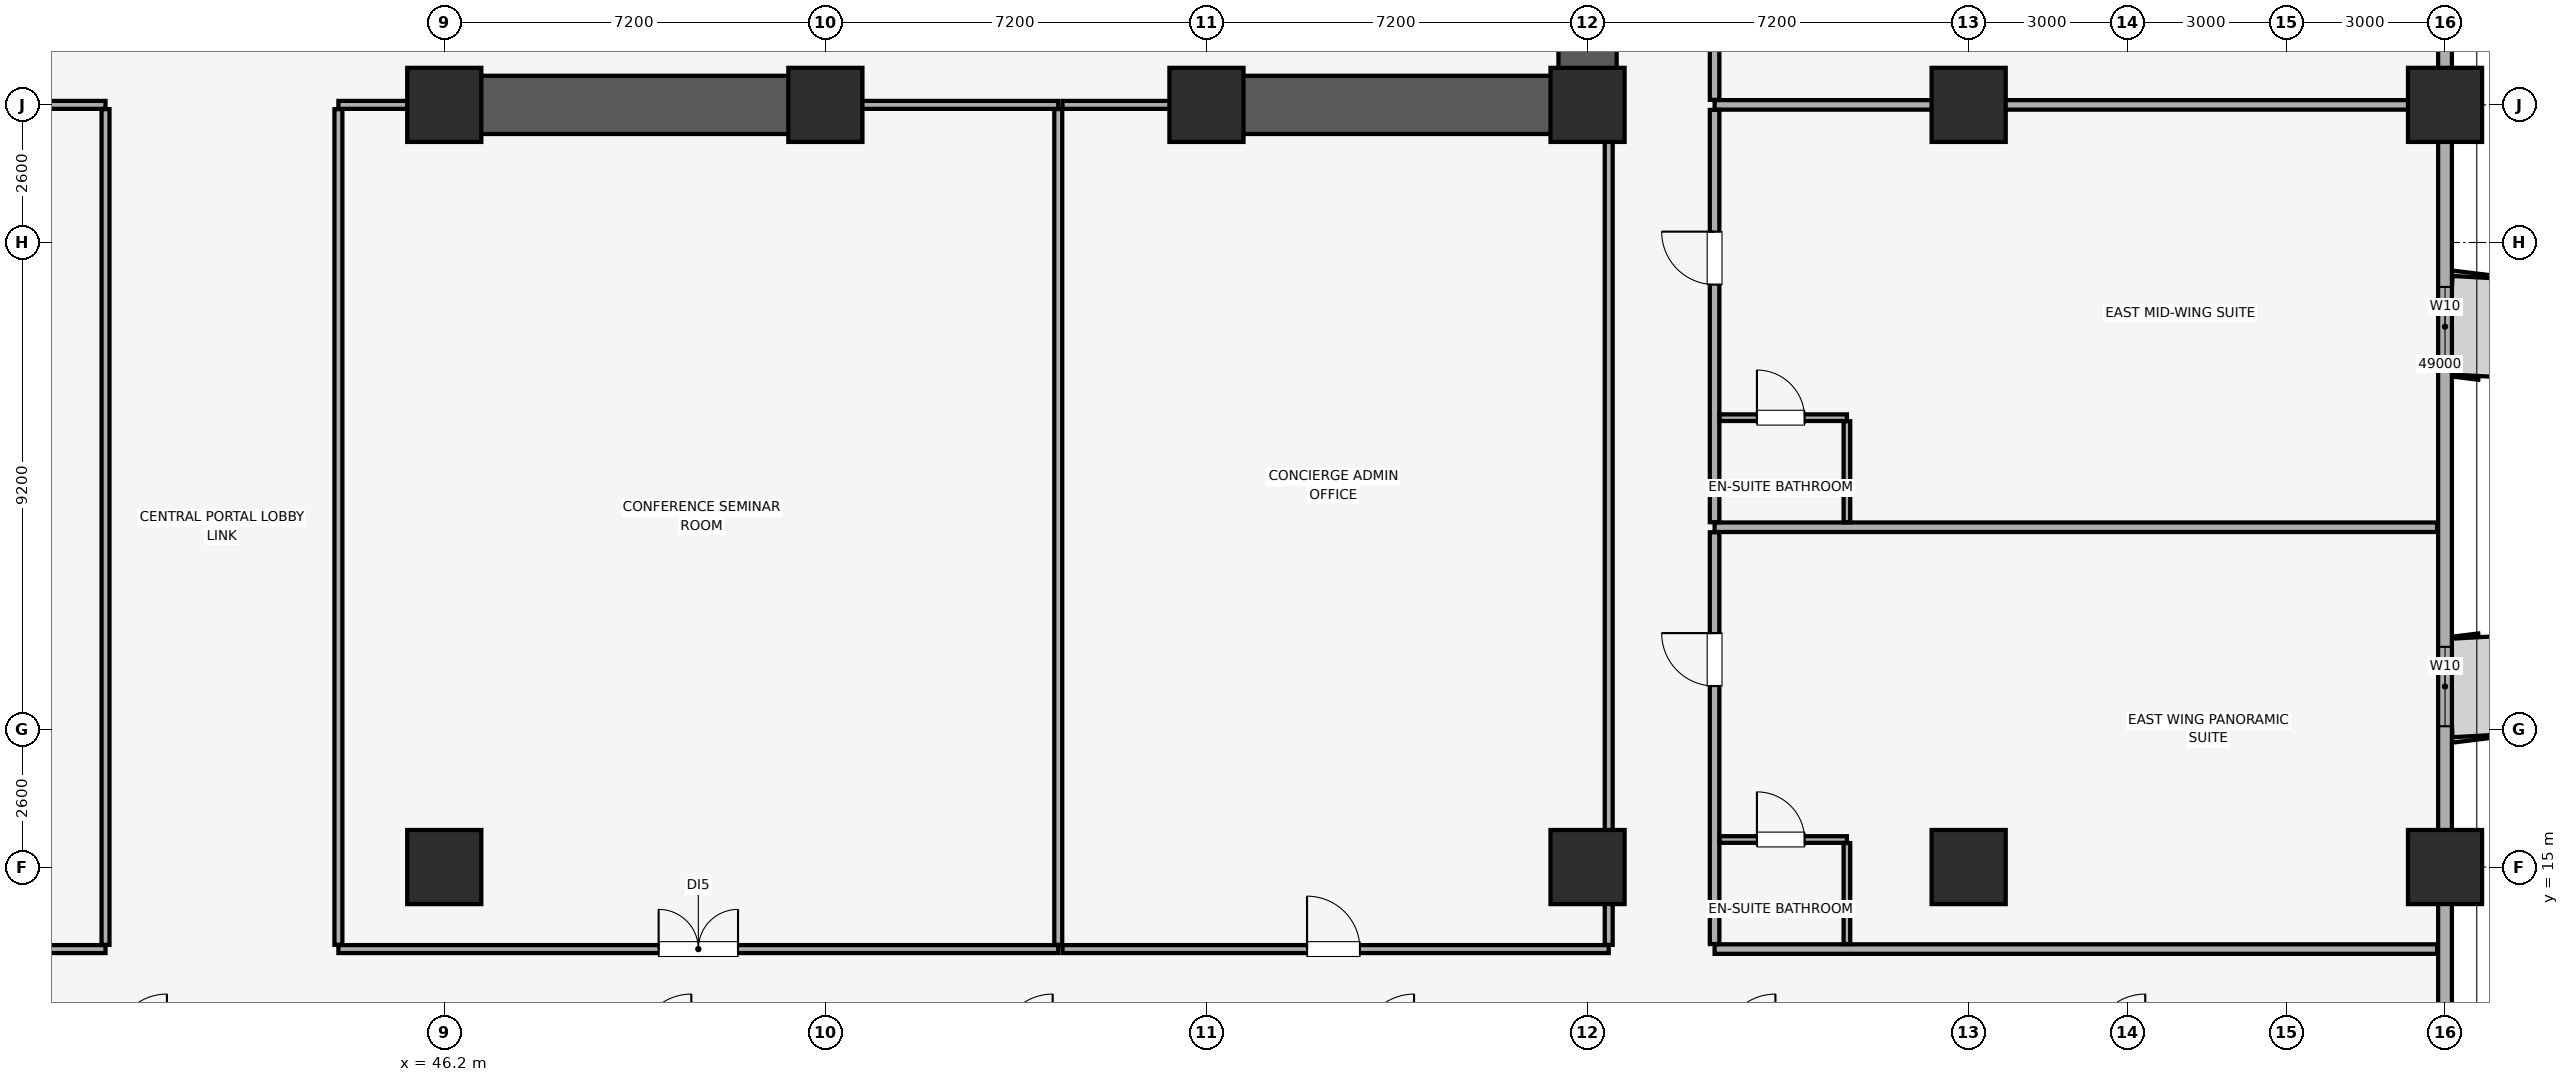
"""IFC4 building model, lengths in metres.
Left out: names, types, materials, properties, quantities, classifications, styles, units other than length and angle.
Written with IfcOpenShell. Run it as: python <this file> out.ifc"""

import sys

from ifc_helpers import new_model, si_unit, direction, frame, frame_2d, origin, origin_2d, place, context, subcontext, project, spatial, rectangle, extrude, element, fill, save


model = new_model("IFC4")
c1 = context("Model", 3, precision=1e-05, world=origin(), true_north=direction((0.0, 1.0)))
c2 = subcontext(c1, "Body", "Model", "MODEL_VIEW")
j1 = project(units=[si_unit("LENGTHUNIT", "METRE"), si_unit("PLANEANGLEUNIT", "RADIAN")], contexts=[c1])
p1 = place(None, origin())
s1 = spatial("IfcSite", under=j1, at=p1, CompositionType="ELEMENT")
p2 = place(p1, origin())
s2 = spatial("IfcBuilding", under=s1, at=p2, CompositionType="ELEMENT")
p3 = place(p2, frame((0.0, 0.0, 57.65)))
s3 = spatial("IfcBuildingStorey", under=s2, at=p3, CompositionType="ELEMENT", Elevation=57.65)
for number, where, z_axis, x_axis in (
    (1, (84.0, 15.0, 0.0), (0.0, 0.0, 1.0), (1.0, 0.0, 0.0)),
    (2, (84.0, 29.4, 0.0), (0.0, 0.0, 1.0), (1.0, 0.0, 0.0)),
    (3, (46.2, 15.0, 0.0), (0.0, 0.0, 1.0), (1.0, 0.0, 0.0)),
    (4, (67.8, 15.0, 0.0), (0.0, 0.0, 1.0), (1.0, 0.0, 0.0)),
    (5, (75.0, 15.0, 0.0), (0.0, 0.0, 1.0), (1.0, 0.0, 0.0)),
    (6, (46.2, 29.4, 0.0), (0.0, 0.0, 1.0), (1.0, 0.0, 0.0)),
    (7, (53.4, 29.4, 0.0), (0.0, 0.0, 1.0), (1.0, 0.0, 0.0)),
    (8, (60.6, 29.4, 0.0), (0.0, 0.0, 1.0), (1.0, 0.0, 0.0)),
    (9, (67.8, 29.4, 0.0), (0.0, 0.0, 1.0), (1.0, 0.0, 0.0)),
    (10, (75.0, 29.4, 0.0), (0.0, 0.0, 1.0), (1.0, 0.0, 0.0)),
):
    element("IfcColumn", number, at=place(p3, frame(where, z_axis=z_axis, x_axis=x_axis)), inside=s3, PredefinedType="COLUMN", context=c2, shape_type="SweptSolid", body=[
        extrude(rectangle(XDim=1.4, YDim=1.4, at=origin_2d()), origin(), (0.0, 0.0, 1.0), 3.51),
    ])
p4 = place(p3, frame((84.0, 4.2, 0.0), z_axis=(0.0, 0.0, 1.0), x_axis=(0.0, 1.0, 0.0)))
e11 = element("IfcWall", 11, at=p4, inside=s3, PredefinedType="SOLIDWALL", context=c2, shape_type="SweptSolid", body=[
    extrude(rectangle(XDim=40.6, YDim=0.26, at=frame_2d((20.3, 0.0))), origin(), (0.0, 0.0, 1.0), 2.56),
])
p5 = place(p4, frame((4.55, 0.0, 0.85)))
e12 = element("IfcOpeningElement", 12, at=p5, cuts=e11, PredefinedType="OPENING", context=c2, shape_type="SweptSolid", body=[
    extrude(rectangle(XDim=1.5, YDim=1.4, at=frame_2d((0.75, 0.7))), frame((0.0, 0.14, 0.0), z_axis=(0.0, -1.0, 0.0), x_axis=(1.0, 0.0, 0.0)), (0.0, 0.0, 1.0), 0.28),
])
p6 = place(p4, frame((13.46, 0.0, 0.85)))
e13 = element("IfcOpeningElement", 13, at=p6, cuts=e11, PredefinedType="OPENING", context=c2, shape_type="SweptSolid", body=[
    extrude(rectangle(XDim=1.5, YDim=1.4, at=frame_2d((0.75, 0.7))), frame((0.0, 0.14, 0.0), z_axis=(0.0, -1.0, 0.0), x_axis=(1.0, 0.0, 0.0)), (0.0, 0.0, 1.0), 0.28),
])
p7 = place(p4, frame((20.26, 0.0, 0.85)))
e14 = element("IfcOpeningElement", 14, at=p7, cuts=e11, PredefinedType="OPENING", context=c2, shape_type="SweptSolid", body=[
    extrude(rectangle(XDim=1.5, YDim=1.4, at=frame_2d((0.75, 0.7))), frame((0.0, 0.14, 0.0), z_axis=(0.0, -1.0, 0.0), x_axis=(1.0, 0.0, 0.0)), (0.0, 0.0, 1.0), 0.28),
])
p8 = place(p4, frame((27.165, 0.0, 0.85)))
e15 = element("IfcOpeningElement", 15, at=p8, cuts=e11, PredefinedType="OPENING", context=c2, shape_type="SweptSolid", body=[
    extrude(rectangle(XDim=1.5, YDim=1.4, at=frame_2d((0.75, 0.7))), frame((0.0, 0.14, 0.0), z_axis=(0.0, -1.0, 0.0), x_axis=(1.0, 0.0, 0.0)), (0.0, 0.0, 1.0), 0.28),
])
p9 = place(p4, frame((31.935, 0.0, 0.85)))
e16 = element("IfcOpeningElement", 16, at=p9, cuts=e11, PredefinedType="OPENING", context=c2, shape_type="SweptSolid", body=[
    extrude(rectangle(XDim=1.5, YDim=1.4, at=frame_2d((0.75, 0.7))), frame((0.0, 0.14, 0.0), z_axis=(0.0, -1.0, 0.0), x_axis=(1.0, 0.0, 0.0)), (0.0, 0.0, 1.0), 0.28),
])
p10 = place(p4, frame((37.365, 0.0, 0.85)))
e17 = element("IfcOpeningElement", 17, at=p10, cuts=e11, PredefinedType="OPENING", context=c2, shape_type="SweptSolid", body=[
    extrude(rectangle(XDim=1.5, YDim=1.4, at=frame_2d((0.75, 0.7))), frame((0.0, 0.14, 0.0), z_axis=(0.0, -1.0, 0.0), x_axis=(1.0, 0.0, 0.0)), (0.0, 0.0, 1.0), 0.28),
])
p11 = place(p3, frame((67.8, 29.4, 0.0), z_axis=(0.0, 0.0, 1.0), x_axis=(0.0, 1.0, 0.0)))
e18 = element("IfcWall", 18, at=p11, inside=s3, PredefinedType="SHEAR", context=c2, shape_type="SweptSolid", body=[
    extrude(rectangle(XDim=19.2, YDim=1.1, at=frame_2d((9.6, 0.0))), origin(), (0.0, 0.0, 1.0), 3.51),
])
p12 = place(p3, frame((46.0, 29.4, 0.0), z_axis=(0.0, 0.0, 1.0), x_axis=(1.0, 0.0, 0.0)))
e19 = element("IfcWall", 19, at=p12, inside=s3, PredefinedType="SHEAR", context=c2, shape_type="SweptSolid", body=[
    extrude(rectangle(XDim=7.6, YDim=1.1, at=frame_2d((3.8, 0.0))), origin(), (0.0, 0.0, 1.0), 3.51),
])
p13 = place(p3, frame((60.4, 29.4, 0.0), z_axis=(0.0, 0.0, 1.0), x_axis=(1.0, 0.0, 0.0)))
e20 = element("IfcWall", 20, at=p13, inside=s3, PredefinedType="SHEAR", context=c2, shape_type="SweptSolid", body=[
    extrude(rectangle(XDim=6.845, YDim=1.1, at=frame_2d((3.423, 0.0))), origin(), (0.0, 0.0, 1.0), 3.51),
])
p14 = place(p3, frame((29.08, 13.45, 0.0), z_axis=(0.0, 0.0, 1.0), x_axis=(1.0, 0.0, 0.0)))
e21 = element("IfcWall", 21, at=p14, inside=s3, PredefinedType="PARTITIONING", context=c2, shape_type="SweptSolid", body=[
    extrude(rectangle(XDim=10.72, YDim=0.15, at=frame_2d((5.36, 0.0))), origin(), (0.0, 0.0, 1.0), 3.51),
])
p15 = place(p14, frame((4.82, 0.0, 0.0)))
e22 = element("IfcOpeningElement", 22, at=p15, cuts=e21, PredefinedType="OPENING", context=c2, shape_type="SweptSolid", body=[
    extrude(rectangle(XDim=1.0, YDim=2.15, at=frame_2d((0.5, 1.075))), frame((0.0, 0.085, 0.0), z_axis=(0.0, -1.0, 0.0), x_axis=(1.0, 0.0, 0.0)), (0.0, 0.0, 1.0), 0.17),
])
p16 = place(p3, frame((38.01, 29.4, 0.0), z_axis=(0.0, 0.0, 1.0), x_axis=(1.0, 0.0, 0.0)))
e23 = element("IfcWall", 23, at=p16, inside=s3, PredefinedType="PARTITIONING", context=c2, shape_type="SweptSolid", body=[
    extrude(rectangle(XDim=1.79, YDim=0.15, at=frame_2d((0.895, 0.0))), origin(), (0.0, 0.0, 1.0), 2.41),
])
p17 = place(p3, frame((39.8, 13.53, 0.0), z_axis=(0.0, 0.0, 1.0), x_axis=(0.0, 1.0, 0.0)))
e24 = element("IfcWall", 24, at=p17, inside=s3, PredefinedType="PARTITIONING", context=c2, shape_type="SweptSolid", body=[
    extrude(rectangle(XDim=15.79, YDim=0.15, at=frame_2d((7.895, 0.0))), origin(), (0.0, 0.0, 1.0), 3.51),
])
p18 = place(p3, frame((44.2, 13.45, 0.0), z_axis=(0.0, 0.0, 1.0), x_axis=(1.0, 0.0, 0.0)))
e25 = element("IfcWall", 25, at=p18, inside=s3, PredefinedType="PARTITIONING", context=c2, shape_type="SweptSolid", body=[
    extrude(rectangle(XDim=13.6, YDim=0.15, at=frame_2d((6.8, 0.0))), origin(), (0.0, 0.0, 1.0), 3.51),
])
p19 = place(p18, frame((6.05, 0.0, 0.0)))
e26 = element("IfcOpeningElement", 26, at=p19, cuts=e25, PredefinedType="OPENING", context=c2, shape_type="SweptSolid", body=[
    extrude(rectangle(XDim=1.5, YDim=2.25, at=frame_2d((0.75, 1.125))), frame((0.0, 0.085, 0.0), z_axis=(0.0, -1.0, 0.0), x_axis=(1.0, 0.0, 0.0)), (0.0, 0.0, 1.0), 0.17),
])
p20 = place(p3, frame((44.2, 29.4, 0.0), z_axis=(0.0, 0.0, 1.0), x_axis=(1.0, 0.0, 0.0)))
e27 = element("IfcWall", 27, at=p20, inside=s3, PredefinedType="PARTITIONING", context=c2, shape_type="SweptSolid", body=[
    extrude(rectangle(XDim=1.79, YDim=0.15, at=frame_2d((0.895, 0.0))), origin(), (0.0, 0.0, 1.0), 2.41),
])
p21 = place(p3, frame((53.61, 29.4, 0.0), z_axis=(0.0, 0.0, 1.0), x_axis=(1.0, 0.0, 0.0)))
e28 = element("IfcWall", 28, at=p21, inside=s3, PredefinedType="PARTITIONING", context=c2, shape_type="SweptSolid", body=[
    extrude(rectangle(XDim=4.19, YDim=0.15, at=frame_2d((2.095, 0.0))), origin(), (0.0, 0.0, 1.0), 2.41),
])
for number, where, z_axis, x_axis in (
    (29, (44.2, 13.53, 0.0), (0.0, 0.0, 1.0), (0.0, 1.0, 0.0)),
    (30, (57.8, 13.53, 0.0), (0.0, 0.0, 1.0), (0.0, 1.0, 0.0)),
):
    element("IfcWall", number, at=place(p3, frame(where, z_axis=z_axis, x_axis=x_axis)), inside=s3, PredefinedType="PARTITIONING", context=c2, shape_type="SweptSolid", body=[
        extrude(rectangle(XDim=15.79, YDim=0.15, at=frame_2d((7.895, 0.0))), origin(), (0.0, 0.0, 1.0), 3.51),
    ])
p22 = place(p3, frame((57.88, 13.45, 0.0), z_axis=(0.0, 0.0, 1.0), x_axis=(1.0, 0.0, 0.0)))
e31 = element("IfcWall", 31, at=p22, inside=s3, PredefinedType="PARTITIONING", context=c2, shape_type="SweptSolid", body=[
    extrude(rectangle(XDim=10.32, YDim=0.15, at=frame_2d((5.16, 0.0))), origin(), (0.0, 0.0, 1.0), 3.51),
])
p23 = place(p22, frame((4.62, 0.0, 0.0)))
e32 = element("IfcOpeningElement", 32, at=p23, cuts=e31, PredefinedType="OPENING", context=c2, shape_type="SweptSolid", body=[
    extrude(rectangle(XDim=1.0, YDim=2.15, at=frame_2d((0.5, 1.075))), frame((0.0, 0.085, 0.0), z_axis=(0.0, -1.0, 0.0), x_axis=(1.0, 0.0, 0.0)), (0.0, 0.0, 1.0), 0.17),
])
p24 = place(p3, frame((57.88, 29.4, 0.0), z_axis=(0.0, 0.0, 1.0), x_axis=(1.0, 0.0, 0.0)))
e33 = element("IfcWall", 33, at=p24, inside=s3, PredefinedType="PARTITIONING", context=c2, shape_type="SweptSolid", body=[
    extrude(rectangle(XDim=2.51, YDim=0.15, at=frame_2d((1.255, 0.0))), origin(), (0.0, 0.0, 1.0), 2.41),
])
p25 = place(p3, frame((68.2, 13.53, 0.0), z_axis=(0.0, 0.0, 1.0), x_axis=(0.0, 1.0, 0.0)))
e34 = element("IfcWall", 34, at=p25, inside=s3, PredefinedType="PARTITIONING", context=c2, shape_type="SweptSolid", body=[
    extrude(rectangle(XDim=15.86, YDim=0.15, at=frame_2d((7.93, 0.0))), origin(), (0.0, 0.0, 1.0), 3.51),
])
for number, where, z_axis, x_axis in (
    (35, (70.2, 13.45, 0.0), (0.0, 0.0, 1.0), (1.0, 0.0, 0.0)),
    (36, (70.2, 21.42, 0.0), (0.0, 0.0, 1.0), (1.0, 0.0, 0.0)),
):
    element("IfcWall", number, at=place(p3, frame(where, z_axis=z_axis, x_axis=x_axis)), inside=s3, PredefinedType="PARTITIONING", context=c2, shape_type="SweptSolid", body=[
        extrude(rectangle(XDim=13.65, YDim=0.18, at=frame_2d((6.825, 0.0))), origin(), (0.0, 0.0, 1.0), 3.51),
    ])
p26 = place(p3, frame((70.2, 13.545, 0.0), z_axis=(0.0, 0.0, 1.0), x_axis=(0.0, 1.0, 0.0)))
e37 = element("IfcWall", 37, at=p26, inside=s3, PredefinedType="PARTITIONING", context=c2, shape_type="SweptSolid", body=[
    extrude(rectangle(XDim=7.78, YDim=0.18, at=frame_2d((3.89, 0.0))), origin(), (0.0, 0.0, 1.0), 3.51),
])
p27 = place(p26, frame((4.875, 0.0, 0.0)))
e38 = element("IfcOpeningElement", 38, at=p27, cuts=e37, PredefinedType="OPENING", context=c2, shape_type="SweptSolid", body=[
    extrude(rectangle(XDim=1.0, YDim=2.15, at=frame_2d((0.5, 1.075))), frame((0.0, 0.1, 0.0), z_axis=(0.0, -1.0, 0.0), x_axis=(1.0, 0.0, 0.0)), (0.0, 0.0, 1.0), 0.2),
])
p28 = place(p3, frame((70.295, 15.52, 0.0), z_axis=(0.0, 0.0, 1.0), x_axis=(1.0, 0.0, 0.0)))
e39 = element("IfcWall", 39, at=p28, inside=s3, PredefinedType="PARTITIONING", context=c2, shape_type="SweptSolid", body=[
    extrude(rectangle(XDim=2.405, YDim=0.125, at=frame_2d((1.203, 0.0))), origin(), (0.0, 0.0, 1.0), 3.51),
])
p29 = place(p28, frame((0.705, 0.0, 0.0)))
e40 = element("IfcOpeningElement", 40, at=p29, cuts=e39, PredefinedType="OPENING", context=c2, shape_type="SweptSolid", body=[
    extrude(rectangle(XDim=0.9, YDim=2.1, at=frame_2d((0.45, 1.05))), frame((0.0, 0.073, 0.0), z_axis=(0.0, -1.0, 0.0), x_axis=(1.0, 0.0, 0.0)), (0.0, 0.0, 1.0), 0.145),
])
p30 = place(p3, frame((72.7, 13.545, 0.0), z_axis=(0.0, 0.0, 1.0), x_axis=(0.0, 1.0, 0.0)))
e41 = element("IfcWall", 41, at=p30, inside=s3, PredefinedType="PARTITIONING", context=c2, shape_type="SweptSolid", body=[
    extrude(rectangle(XDim=1.907, YDim=0.125, at=frame_2d((0.954, 0.0))), origin(), (0.0, 0.0, 1.0), 3.51),
])
p31 = place(p3, frame((70.2, 29.4, 0.0), z_axis=(0.0, 0.0, 1.0), x_axis=(1.0, 0.0, 0.0)))
e42 = element("IfcWall", 42, at=p31, inside=s3, PredefinedType="PARTITIONING", context=c2, shape_type="SweptSolid", body=[
    extrude(rectangle(XDim=13.65, YDim=0.18, at=frame_2d((6.825, 0.0))), origin(), (0.0, 0.0, 1.0), 2.86),
])
p32 = place(p3, frame((70.2, 21.515, 0.0), z_axis=(0.0, 0.0, 1.0), x_axis=(0.0, 1.0, 0.0)))
e43 = element("IfcWall", 43, at=p32, inside=s3, PredefinedType="PARTITIONING", context=c2, shape_type="SweptSolid", body=[
    extrude(rectangle(XDim=7.79, YDim=0.18, at=frame_2d((3.895, 0.0))), origin(), (0.0, 0.0, 1.0), 3.51),
])
p33 = place(p32, frame((4.49, 0.0, 0.0)))
e44 = element("IfcOpeningElement", 44, at=p33, cuts=e43, PredefinedType="OPENING", context=c2, shape_type="SweptSolid", body=[
    extrude(rectangle(XDim=1.0, YDim=2.15, at=frame_2d((0.5, 1.075))), frame((0.0, 0.1, 0.0), z_axis=(0.0, -1.0, 0.0), x_axis=(1.0, 0.0, 0.0)), (0.0, 0.0, 1.0), 0.2),
])
p34 = place(p3, frame((70.295, 23.49, 0.0), z_axis=(0.0, 0.0, 1.0), x_axis=(1.0, 0.0, 0.0)))
e45 = element("IfcWall", 45, at=p34, inside=s3, PredefinedType="PARTITIONING", context=c2, shape_type="SweptSolid", body=[
    extrude(rectangle(XDim=2.405, YDim=0.125, at=frame_2d((1.203, 0.0))), origin(), (0.0, 0.0, 1.0), 3.51),
])
p35 = place(p34, frame((0.705, 0.0, 0.0)))
e46 = element("IfcOpeningElement", 46, at=p35, cuts=e45, PredefinedType="OPENING", context=c2, shape_type="SweptSolid", body=[
    extrude(rectangle(XDim=0.9, YDim=2.1, at=frame_2d((0.45, 1.05))), frame((0.0, 0.073, 0.0), z_axis=(0.0, -1.0, 0.0), x_axis=(1.0, 0.0, 0.0)), (0.0, 0.0, 1.0), 0.145),
])
p36 = place(p3, frame((72.7, 21.515, 0.0), z_axis=(0.0, 0.0, 1.0), x_axis=(0.0, 1.0, 0.0)))
e47 = element("IfcWall", 47, at=p36, inside=s3, PredefinedType="PARTITIONING", context=c2, shape_type="SweptSolid", body=[
    extrude(rectangle(XDim=1.908, YDim=0.125, at=frame_2d((0.954, 0.0))), origin(), (0.0, 0.0, 1.0), 3.51),
])
p37 = place(p3, frame((70.2, 29.495, 0.0), z_axis=(0.0, 0.0, 1.0), x_axis=(0.0, 1.0, 0.0)))
e48 = element("IfcWall", 48, at=p37, inside=s3, PredefinedType="PARTITIONING", context=c2, shape_type="SweptSolid", body=[
    extrude(rectangle(XDim=19.355, YDim=0.18, at=frame_2d((9.677, 0.0))), origin(), (0.0, 0.0, 1.0), 3.51),
])
p38 = place(p37, frame((4.505, 0.0, 0.0)))
e49 = element("IfcOpeningElement", 49, at=p38, cuts=e48, PredefinedType="OPENING", context=c2, shape_type="SweptSolid", body=[
    extrude(rectangle(XDim=1.0, YDim=2.15, at=frame_2d((0.5, 1.075))), frame((0.0, 0.1, 0.0), z_axis=(0.0, -1.0, 0.0), x_axis=(1.0, 0.0, 0.0)), (0.0, 0.0, 1.0), 0.2),
])
p39 = place(p6, origin())
e50 = element("IfcWindow", 50, at=p39, inside=s3, PartitioningType="SINGLE_PANEL", PredefinedType="WINDOW", context=c2, shape_type="SweptSolid", body=[
    extrude(rectangle(XDim=1.5, YDim=1.4, at=frame_2d((0.75, 0.7))), frame((0.0, 0.03, 0.0), z_axis=(0.0, -1.0, 0.0), x_axis=(1.0, 0.0, 0.0)), (0.0, 0.0, 1.0), 0.06),
])
fill(e13, e50)
p40 = place(p7, origin())
e51 = element("IfcWindow", 51, at=p40, inside=s3, PartitioningType="SINGLE_PANEL", PredefinedType="WINDOW", context=c2, shape_type="SweptSolid", body=[
    extrude(rectangle(XDim=1.5, YDim=1.4, at=frame_2d((0.75, 0.7))), frame((0.0, 0.03, 0.0), z_axis=(0.0, -1.0, 0.0), x_axis=(1.0, 0.0, 0.0)), (0.0, 0.0, 1.0), 0.06),
])
fill(e14, e51)
p41 = place(p19, origin())
e52 = element("IfcDoor", 52, at=p41, inside=s3, OperationType="DOUBLE_DOOR_SINGLE_SWING", PredefinedType="DOOR", context=c2, shape_type="SweptSolid", body=[
    extrude(rectangle(XDim=1.5, YDim=2.25, at=frame_2d((0.75, 1.125))), frame((0.0, 0.025, 0.0), z_axis=(0.0, -1.0, 0.0), x_axis=(1.0, 0.0, 0.0)), (0.0, 0.0, 1.0), 0.05),
])
fill(e26, e52)
p42 = place(p23, origin())
e53 = element("IfcDoor", 53, at=p42, inside=s3, OperationType="SINGLE_SWING_LEFT", PredefinedType="DOOR", context=c2, shape_type="SweptSolid", body=[
    extrude(rectangle(XDim=1.0, YDim=2.15, at=frame_2d((0.5, 1.075))), frame((0.0, 0.025, 0.0), z_axis=(0.0, -1.0, 0.0), x_axis=(1.0, 0.0, 0.0)), (0.0, 0.0, 1.0), 0.05),
])
fill(e32, e53)
p43 = place(p27, origin())
e54 = element("IfcDoor", 54, at=p43, inside=s3, OperationType="SINGLE_SWING_RIGHT", PredefinedType="DOOR", context=c2, shape_type="SweptSolid", body=[
    extrude(rectangle(XDim=1.0, YDim=2.15, at=frame_2d((0.5, 1.075))), frame((0.0, 0.025, 0.0), z_axis=(0.0, -1.0, 0.0), x_axis=(1.0, 0.0, 0.0)), (0.0, 0.0, 1.0), 0.05),
])
fill(e38, e54)
p44 = place(p29, origin())
e55 = element("IfcDoor", 55, at=p44, inside=s3, OperationType="SINGLE_SWING_LEFT", PredefinedType="DOOR", context=c2, shape_type="SweptSolid", body=[
    extrude(rectangle(XDim=0.9, YDim=2.1, at=frame_2d((0.45, 1.05))), frame((0.0, 0.025, 0.0), z_axis=(0.0, -1.0, 0.0), x_axis=(1.0, 0.0, 0.0)), (0.0, 0.0, 1.0), 0.05),
])
fill(e40, e55)
p45 = place(p33, origin())
e56 = element("IfcDoor", 56, at=p45, inside=s3, OperationType="SINGLE_SWING_RIGHT", PredefinedType="DOOR", context=c2, shape_type="SweptSolid", body=[
    extrude(rectangle(XDim=1.0, YDim=2.15, at=frame_2d((0.5, 1.075))), frame((0.0, 0.025, 0.0), z_axis=(0.0, -1.0, 0.0), x_axis=(1.0, 0.0, 0.0)), (0.0, 0.0, 1.0), 0.05),
])
fill(e44, e56)
p46 = place(p35, origin())
e57 = element("IfcDoor", 57, at=p46, inside=s3, OperationType="SINGLE_SWING_LEFT", PredefinedType="DOOR", context=c2, shape_type="SweptSolid", body=[
    extrude(rectangle(XDim=0.9, YDim=2.1, at=frame_2d((0.45, 1.05))), frame((0.0, 0.025, 0.0), z_axis=(0.0, -1.0, 0.0), x_axis=(1.0, 0.0, 0.0)), (0.0, 0.0, 1.0), 0.05),
])
fill(e46, e57)
save(model, sys.argv[1])
